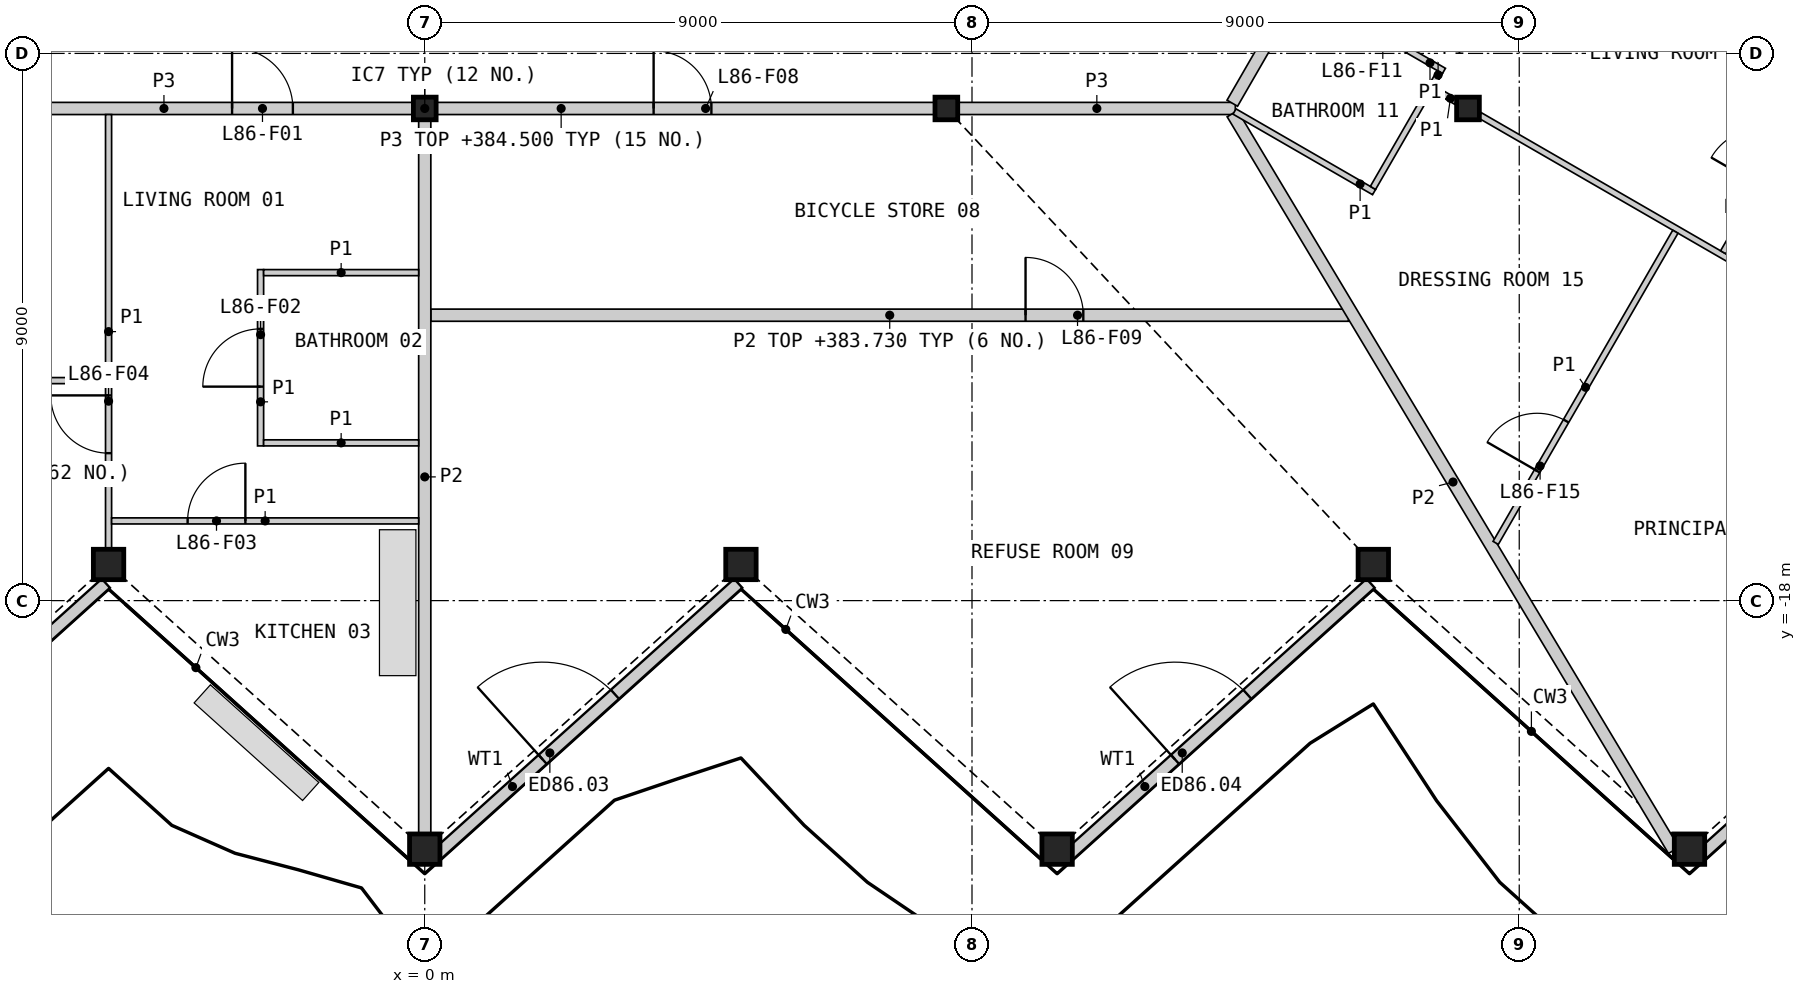
"""IFC4 building model, lengths in metres.
Left out: names, types, materials, properties, quantities, classifications, styles, units other than length and angle.
Written with IfcOpenShell. Run it as: python <this file> out.ifc"""

import sys

from ifc_helpers import new_model, si_unit, direction, frame, frame_2d, origin, origin_2d, place, context, subcontext, project, spatial, rectangle, hollow_rectangle, i_section, extrude, element, fill, save


model = new_model("IFC4")
c1 = context("Model", 3, precision=1e-05, world=origin(), true_north=direction((0.0, 1.0)))
c2 = subcontext(c1, "Body", "Model", "MODEL_VIEW")
j1 = project(units=[si_unit("LENGTHUNIT", "METRE"), si_unit("PLANEANGLEUNIT", "RADIAN")], contexts=[c1])
p1 = place(None, origin())
s1 = spatial("IfcSite", under=j1, at=p1, CompositionType="ELEMENT")
p2 = place(p1, origin())
s2 = spatial("IfcBuilding", under=s1, at=p2, CompositionType="ELEMENT")
p3 = place(p2, frame((0.0, 0.0, 381.4)))
s3 = spatial("IfcBuildingStorey", under=s2, at=p3, CompositionType="ELEMENT", Elevation=381.4)
for number, where, z_axis, x_axis in (
    (1, (-5.2, -17.406, 0.0), (0.0, 0.0, 1.0), (1.0, 0.0, 0.0)),
    (2, (0.0, -22.088, 0.0), (0.0, 0.0, 1.0), (1.0, 0.0, 0.0)),
    (3, (5.2, -17.406, 0.0), (0.0, 0.0, 1.0), (1.0, 0.0, 0.0)),
    (4, (10.4, -22.088, 0.0), (0.0, 0.0, 1.0), (1.0, 0.0, 0.0)),
    (5, (15.6, -17.406, 0.0), (0.0, 0.0, 1.0), (1.0, 0.0, 0.0)),
    (6, (20.8, -22.088, 0.0), (0.0, 0.0, 1.0), (1.0, 0.0, 0.0)),
):
    element("IfcColumn", number, at=place(p3, frame(where, z_axis=z_axis, x_axis=x_axis)), inside=s3, PredefinedType="COLUMN", context=c2, shape_type="SweptSolid", body=[
        extrude(hollow_rectangle(XDim=0.5, YDim=0.5, WallThickness=0.03, at=origin_2d()), origin(), (0.0, 0.0, 1.0), 3.4),
    ])
for number, where, z_axis, x_axis in (
    (7, (0.0, -9.906, 0.0), (0.0, 0.0, 1.0), (1.0, 0.0, 0.0)),
    (8, (8.578, -9.906, 0.0), (0.0, 0.0, 1.0), (1.0, 0.0, 0.0)),
    (9, (17.157, -9.906, 0.0), (0.0, 0.0, 1.0), (1.0, 0.0, 0.0)),
):
    element("IfcColumn", number, at=place(p3, frame(where, z_axis=z_axis, x_axis=x_axis)), inside=s3, PredefinedType="COLUMN", context=c2, shape_type="SweptSolid", body=[
        extrude(i_section(OverallWidth=0.374, OverallDepth=0.372, WebThickness=0.016, FlangeThickness=0.026, at=origin_2d()), origin(), (0.0, 0.0, 1.0), 3.4),
    ])
p4 = place(p3, frame((-10.195, -22.173, 0.0), z_axis=(0.0, 0.0, 1.0), x_axis=(0.743119171875, 0.669159096473, 0.0)))
e10 = element("IfcWall", 10, at=p4, inside=s3, PredefinedType="SOLIDWALL", context=c2, shape_type="SweptSolid", body=[
    extrude(rectangle(XDim=6.661, YDim=0.2, at=frame_2d((3.331, 0.0))), origin(), (0.0, 0.0, 1.0), 2.634),
])
p5 = place(p4, frame((2.333, 0.0, 0.0)))
e11 = element("IfcOpeningElement", 11, at=p5, cuts=e10, PredefinedType="OPENING", context=c2, shape_type="SweptSolid", body=[
    extrude(rectangle(XDim=1.6, YDim=2.25, at=frame_2d((0.8, 1.125))), frame((0.0, 0.11, 0.0), z_axis=(0.0, -1.0, 0.0), x_axis=(1.0, 0.0, 0.0)), (0.0, 0.0, 1.0), 0.22),
])
p6 = place(p3, frame((0.205, -22.173, 0.0), z_axis=(0.0, 0.0, 1.0), x_axis=(0.743135582201, 0.669140871915, 0.0)))
e12 = element("IfcWall", 12, at=p6, inside=s3, PredefinedType="SOLIDWALL", context=c2, shape_type="SweptSolid", body=[
    extrude(rectangle(XDim=6.662, YDim=0.2, at=frame_2d((3.331, 0.0))), origin(), (0.0, 0.0, 1.0), 2.634),
])
p7 = place(p6, frame((2.333, 0.0, 0.0)))
e13 = element("IfcOpeningElement", 13, at=p7, cuts=e12, PredefinedType="OPENING", context=c2, shape_type="SweptSolid", body=[
    extrude(rectangle(XDim=1.6, YDim=2.25, at=frame_2d((0.8, 1.125))), frame((0.0, 0.11, 0.0), z_axis=(0.0, -1.0, 0.0), x_axis=(1.0, 0.0, 0.0)), (0.0, 0.0, 1.0), 0.22),
])
p8 = place(p3, frame((10.605, -22.173, 0.0), z_axis=(0.0, 0.0, 1.0), x_axis=(0.743135582201, 0.669140871915, 0.0)))
e14 = element("IfcWall", 14, at=p8, inside=s3, PredefinedType="SOLIDWALL", context=c2, shape_type="SweptSolid", body=[
    extrude(rectangle(XDim=6.662, YDim=0.2, at=frame_2d((3.331, 0.0))), origin(), (0.0, 0.0, 1.0), 2.634),
])
p9 = place(p8, frame((2.333, 0.0, 0.0)))
e15 = element("IfcOpeningElement", 15, at=p9, cuts=e14, PredefinedType="OPENING", context=c2, shape_type="SweptSolid", body=[
    extrude(rectangle(XDim=1.6, YDim=2.25, at=frame_2d((0.8, 1.125))), frame((0.0, 0.11, 0.0), z_axis=(0.0, -1.0, 0.0), x_axis=(1.0, 0.0, 0.0)), (0.0, 0.0, 1.0), 0.22),
])
p10 = place(p3, frame((21.005, -22.173, 0.0), z_axis=(0.0, 0.0, 1.0), x_axis=(0.743135582201, 0.669140871915, 0.0)))
e16 = element("IfcWall", 16, at=p10, inside=s3, PredefinedType="SOLIDWALL", context=c2, shape_type="SweptSolid", body=[
    extrude(rectangle(XDim=6.662, YDim=0.2, at=frame_2d((3.331, 0.0))), origin(), (0.0, 0.0, 1.0), 2.634),
])
p11 = place(p10, frame((2.333, 0.0, 0.0)))
e17 = element("IfcOpeningElement", 17, at=p11, cuts=e16, PredefinedType="OPENING", context=c2, shape_type="SweptSolid", body=[
    extrude(rectangle(XDim=1.6, YDim=2.25, at=frame_2d((0.8, 1.125))), frame((0.0, 0.11, 0.0), z_axis=(0.0, -1.0, 0.0), x_axis=(1.0, 0.0, 0.0)), (0.0, 0.0, 1.0), 0.22),
])
p12 = place(p3, frame((0.197, -9.906, 0.0), z_axis=(0.0, 0.0, 1.0), x_axis=(1.0, 0.0, 0.0)))
e18 = element("IfcWall", 18, at=p12, inside=s3, PredefinedType="PARTITIONING", context=c2, shape_type="SweptSolid", body=[
    extrude(rectangle(XDim=8.185, YDim=0.2, at=frame_2d((4.092, 0.0))), origin(), (0.0, 0.0, 1.0), 3.1),
])
p13 = place(p12, frame((3.567, 0.0, 0.0)))
e19 = element("IfcOpeningElement", 19, at=p13, cuts=e18, PredefinedType="OPENING", context=c2, shape_type="SweptSolid", body=[
    extrude(rectangle(XDim=0.95, YDim=2.1, at=frame_2d((0.475, 1.05))), frame((0.0, 0.11, 0.0), z_axis=(0.0, -1.0, 0.0), x_axis=(1.0, 0.0, 0.0)), (0.0, 0.0, 1.0), 0.22),
])
p14 = place(p3, frame((-8.382, -9.906, 0.0), z_axis=(0.0, 0.0, 1.0), x_axis=(1.0, 0.0, 0.0)))
e20 = element("IfcWall", 20, at=p14, inside=s3, PredefinedType="PARTITIONING", context=c2, shape_type="SweptSolid", body=[
    extrude(rectangle(XDim=8.185, YDim=0.2, at=frame_2d((4.092, 0.0))), origin(), (0.0, 0.0, 1.0), 3.1),
])
p15 = place(p14, frame((5.213, 0.0, 0.0)))
e21 = element("IfcOpeningElement", 21, at=p15, cuts=e20, PredefinedType="OPENING", context=c2, shape_type="SweptSolid", body=[
    extrude(rectangle(XDim=1.0, YDim=2.1, at=frame_2d((0.5, 1.05))), frame((0.0, 0.11, 0.0), z_axis=(0.0, -1.0, 0.0), x_axis=(1.0, 0.0, 0.0)), (0.0, 0.0, 1.0), 0.22),
])
p16 = place(p3, frame((8.775, -9.906, 0.0), z_axis=(0.0, 0.0, 1.0), x_axis=(1.0, 0.0, 0.0)))
e22 = element("IfcWall", 22, at=p16, inside=s3, PredefinedType="PARTITIONING", context=c2, shape_type="SweptSolid", body=[
    extrude(rectangle(XDim=4.555, YDim=0.2, at=frame_2d((2.278, 0.0))), origin(), (0.0, 0.0, 1.0), 3.1),
])
p17 = place(p3, frame((13.281, -9.819, 0.0), z_axis=(0.0, 0.0, 1.0), x_axis=(0.499948957823, 0.866054870994, 0.0)))
e23 = element("IfcWall", 23, at=p17, inside=s3, PredefinedType="PARTITIONING", context=c2, shape_type="SweptSolid", body=[
    extrude(rectangle(XDim=3.701, YDim=0.2, at=frame_2d((1.851, 0.0))), origin(), (0.0, 0.0, 1.0), 3.1),
])
p18 = place(p17, frame((2.451, 0.0, 0.0)))
e24 = element("IfcOpeningElement", 24, at=p18, cuts=e23, PredefinedType="OPENING", context=c2, shape_type="SweptSolid", body=[
    extrude(rectangle(XDim=1.0, YDim=2.1, at=frame_2d((0.5, 1.05))), frame((0.0, 0.11, 0.0), z_axis=(0.0, -1.0, 0.0), x_axis=(1.0, 0.0, 0.0)), (0.0, 0.0, 1.0), 0.22),
])
p19 = place(p3, frame((0.1, -13.306, 0.0), z_axis=(0.0, 0.0, 1.0), x_axis=(1.0, 0.0, 0.0)))
e25 = element("IfcWall", 25, at=p19, inside=s3, PredefinedType="PARTITIONING", context=c2, shape_type="SweptSolid", body=[
    extrude(rectangle(XDim=15.094, YDim=0.2, at=frame_2d((7.547, 0.0))), origin(), (0.0, 0.0, 1.0), 2.33),
])
p20 = place(p19, frame((9.781, 0.0, 0.0)))
e26 = element("IfcOpeningElement", 26, at=p20, cuts=e25, PredefinedType="OPENING", context=c2, shape_type="SweptSolid", body=[
    extrude(rectangle(XDim=0.95, YDim=2.1, at=frame_2d((0.475, 1.05))), frame((0.0, 0.11, 0.0), z_axis=(0.0, -1.0, 0.0), x_axis=(1.0, 0.0, 0.0)), (0.0, 0.0, 1.0), 0.22),
])
p21 = place(p3, frame((13.282, -9.991, 0.0), z_axis=(0.0, 0.0, 1.0), x_axis=(0.513867741763, -0.857869421285, 0.0)))
e27 = element("IfcWall", 27, at=p21, inside=s3, PredefinedType="PARTITIONING", context=c2, shape_type="SweptSolid", body=[
    extrude(rectangle(XDim=14.124, YDim=0.2, at=frame_2d((7.062, 0.0))), origin(), (0.0, 0.0, 1.0), 2.33),
])
p22 = place(p3, frame((0.0, -21.828, 0.0), z_axis=(0.0, 0.0, 1.0), x_axis=(0.0, 1.0, 0.0)))
e28 = element("IfcWall", 28, at=p22, inside=s3, PredefinedType="PARTITIONING", context=c2, shape_type="SweptSolid", body=[
    extrude(rectangle(XDim=11.725, YDim=0.2, at=frame_2d((5.863, 0.0))), origin(), (0.0, 0.0, 1.0), 2.33),
])
p23 = place(p3, frame((17.354, -10.019, 0.0), z_axis=(0.0, 0.0, 1.0), x_axis=(0.866019680922, -0.500009912158, 0.0)))
e29 = element("IfcWall", 29, at=p23, inside=s3, PredefinedType="PARTITIONING", context=c2, shape_type="SweptSolid", body=[
    extrude(rectangle(XDim=10.881, YDim=0.1, at=frame_2d((5.44, 0.0))), origin(), (0.0, 0.0, 1.0), 2.33),
])
p24 = place(p23, frame((8.176, 0.0, 0.0)))
e30 = element("IfcOpeningElement", 30, at=p24, cuts=e29, PredefinedType="OPENING", context=c2, shape_type="SweptSolid", body=[
    extrude(rectangle(XDim=0.95, YDim=2.1, at=frame_2d((0.475, 1.05))), frame((0.0, 0.06, 0.0), z_axis=(0.0, -1.0, 0.0), x_axis=(1.0, 0.0, 0.0)), (0.0, 0.0, 1.0), 0.12),
])
p25 = place(p3, frame((-5.2, -17.146, 0.0), z_axis=(0.0, 0.0, 1.0), x_axis=(0.0, 1.0, 0.0)))
e31 = element("IfcWall", 31, at=p25, inside=s3, PredefinedType="PARTITIONING", context=c2, shape_type="SweptSolid", body=[
    extrude(rectangle(XDim=7.14, YDim=0.1, at=frame_2d((3.57, 0.0))), origin(), (0.0, 0.0, 1.0), 2.33),
])
p26 = place(p25, frame((1.571, 0.0, 0.0)))
e32 = element("IfcOpeningElement", 32, at=p26, cuts=e31, PredefinedType="OPENING", context=c2, shape_type="SweptSolid", body=[
    extrude(rectangle(XDim=0.95, YDim=2.1, at=frame_2d((0.475, 1.05))), frame((0.0, 0.06, 0.0), z_axis=(0.0, -1.0, 0.0), x_axis=(1.0, 0.0, 0.0)), (0.0, 0.0, 1.0), 0.12),
])
p27 = place(p3, frame((21.354, -12.271, 0.0), z_axis=(0.0, 0.0, 1.0), x_axis=(0.499983931063, 0.866034680991, 0.0)))
e33 = element("IfcWall", 33, at=p27, inside=s3, PredefinedType="PARTITIONING", context=c2, shape_type="SweptSolid", body=[
    extrude(rectangle(XDim=6.358, YDim=0.1, at=frame_2d((3.179, 0.0))), origin(), (0.0, 0.0, 1.0), 2.33),
])
p28 = place(p27, frame((1.252, 0.0, 0.0)))
e34 = element("IfcOpeningElement", 34, at=p28, cuts=e33, PredefinedType="OPENING", context=c2, shape_type="SweptSolid", body=[
    extrude(rectangle(XDim=0.95, YDim=2.1, at=frame_2d((0.475, 1.05))), frame((0.0, 0.06, 0.0), z_axis=(0.0, -1.0, 0.0), x_axis=(1.0, 0.0, 0.0)), (0.0, 0.0, 1.0), 0.12),
])
p29 = place(p3, frame((17.613, -17.051, 0.0), z_axis=(0.0, 0.0, 1.0), x_axis=(0.499982307286, 0.866035618437, 0.0)))
e35 = element("IfcWall", 35, at=p29, inside=s3, PredefinedType="PARTITIONING", context=c2, shape_type="SweptSolid", body=[
    extrude(rectangle(XDim=5.91, YDim=0.1, at=frame_2d((2.955, 0.0))), origin(), (0.0, 0.0, 1.0), 2.33),
])
p30 = place(p29, frame((1.365, 0.0, 0.0)))
e36 = element("IfcOpeningElement", 36, at=p30, cuts=e35, PredefinedType="OPENING", context=c2, shape_type="SweptSolid", body=[
    extrude(rectangle(XDim=0.95, YDim=2.1, at=frame_2d((0.475, 1.05))), frame((0.0, 0.06, 0.0), z_axis=(0.0, -1.0, 0.0), x_axis=(1.0, 0.0, 0.0)), (0.0, 0.0, 1.0), 0.12),
])
p31 = place(p3, frame((-5.15, -16.689, 0.0), z_axis=(0.0, 0.0, 1.0), x_axis=(1.0, 0.0, 0.0)))
e37 = element("IfcWall", 37, at=p31, inside=s3, PredefinedType="PARTITIONING", context=c2, shape_type="SweptSolid", body=[
    extrude(rectangle(XDim=5.05, YDim=0.1, at=frame_2d((2.525, 0.0))), origin(), (0.0, 0.0, 1.0), 2.33),
])
p32 = place(p31, frame((1.25, 0.0, 0.0)))
e38 = element("IfcOpeningElement", 38, at=p32, cuts=e37, PredefinedType="OPENING", context=c2, shape_type="SweptSolid", body=[
    extrude(rectangle(XDim=0.95, YDim=2.1, at=frame_2d((0.475, 1.05))), frame((0.0, 0.06, 0.0), z_axis=(0.0, -1.0, 0.0), x_axis=(1.0, 0.0, 0.0)), (0.0, 0.0, 1.0), 0.12),
])
p33 = place(p3, frame((-10.35, -14.382, 0.0), z_axis=(0.0, 0.0, 1.0), x_axis=(1.0, 0.0, 0.0)))
e39 = element("IfcWall", 39, at=p33, inside=s3, PredefinedType="PARTITIONING", context=c2, shape_type="SweptSolid", body=[
    extrude(rectangle(XDim=5.1, YDim=0.1, at=frame_2d((2.55, 0.0))), origin(), (0.0, 0.0, 1.0), 2.33),
])
p34 = place(p33, frame((0.757, 0.0, 0.0)))
e40 = element("IfcOpeningElement", 40, at=p34, cuts=e39, PredefinedType="OPENING", context=c2, shape_type="SweptSolid", body=[
    extrude(rectangle(XDim=0.95, YDim=2.1, at=frame_2d((0.475, 1.05))), frame((0.0, 0.06, 0.0), z_axis=(0.0, -1.0, 0.0), x_axis=(1.0, 0.0, 0.0)), (0.0, 0.0, 1.0), 0.12),
])
p35 = place(p3, frame((-2.7, -15.456, 0.0), z_axis=(0.0, 0.0, 1.0), x_axis=(0.0, 1.0, 0.0)))
e41 = element("IfcWall", 41, at=p35, inside=s3, PredefinedType="PARTITIONING", context=c2, shape_type="SweptSolid", body=[
    extrude(rectangle(XDim=2.9, YDim=0.1, at=frame_2d((1.45, 0.0))), origin(), (0.0, 0.0, 1.0), 2.33),
])
p36 = place(p35, frame((0.975, 0.0, 0.0)))
e42 = element("IfcOpeningElement", 42, at=p36, cuts=e41, PredefinedType="OPENING", context=c2, shape_type="SweptSolid", body=[
    extrude(rectangle(XDim=0.95, YDim=2.1, at=frame_2d((0.475, 1.05))), frame((0.0, 0.06, 0.0), z_axis=(0.0, -1.0, 0.0), x_axis=(1.0, 0.0, 0.0)), (0.0, 0.0, 1.0), 0.12),
])
for number, where, z_axis, x_axis in (
    (43, (-2.65, -12.606, 0.0), (0.0, 0.0, 1.0), (1.0, 0.0, 0.0)),
    (44, (-2.65, -15.406, 0.0), (0.0, 0.0, 1.0), (1.0, 0.0, 0.0)),
):
    element("IfcWall", number, at=place(p3, frame(where, z_axis=z_axis, x_axis=x_axis)), inside=s3, PredefinedType="PARTITIONING", context=c2, shape_type="SweptSolid", body=[
        extrude(rectangle(XDim=2.55, YDim=0.1, at=frame_2d((1.275, 0.0))), origin(), (0.0, 0.0, 1.0), 2.33),
    ])
p37 = place(p3, frame((13.317, -9.956, 0.0), z_axis=(0.0, 0.0, 1.0), x_axis=(0.866052124492, -0.499953715521, 0.0)))
e45 = element("IfcWall", 45, at=p37, inside=s3, PredefinedType="PARTITIONING", context=c2, shape_type="SweptSolid", body=[
    extrude(rectangle(XDim=2.65, YDim=0.1, at=frame_2d((1.325, 0.0))), origin(), (0.0, 0.0, 1.0), 2.33),
])
p38 = place(p3, frame((14.468, -7.964, 0.0), z_axis=(0.0, 0.0, 1.0), x_axis=(0.86603978909, -0.499975083092, 0.0)))
e46 = element("IfcWall", 46, at=p38, inside=s3, PredefinedType="PARTITIONING", context=c2, shape_type="SweptSolid", body=[
    extrude(rectangle(XDim=2.649, YDim=0.1, at=frame_2d((1.325, 0.0))), origin(), (0.0, 0.0, 1.0), 2.33),
])
p39 = place(p38, frame((1.013, 0.0, 0.0)))
e47 = element("IfcOpeningElement", 47, at=p39, cuts=e46, PredefinedType="OPENING", context=c2, shape_type="SweptSolid", body=[
    extrude(rectangle(XDim=0.95, YDim=2.1, at=frame_2d((0.475, 1.05))), frame((0.0, 0.06, 0.0), z_axis=(0.0, -1.0, 0.0), x_axis=(1.0, 0.0, 0.0)), (0.0, 0.0, 1.0), 0.12),
])
p40 = place(p3, frame((15.594, -11.212, 0.0), z_axis=(0.0, 0.0, 1.0), x_axis=(0.500011643316, 0.866018681408, 0.0)))
e48 = element("IfcWall", 48, at=p40, inside=s3, PredefinedType="PARTITIONING", context=c2, shape_type="SweptSolid", body=[
    extrude(rectangle(XDim=1.973, YDim=0.1, at=frame_2d((0.987, 0.0))), origin(), (0.0, 0.0, 1.0), 2.33),
])
p41 = place(p3, frame((16.594, -9.581, 0.0), z_axis=(0.0, 0.0, 1.0), x_axis=(0.866137484628, -0.499805820016, 0.0)))
e49 = element("IfcWall", 49, at=p41, inside=s3, PredefinedType="PARTITIONING", context=c2, shape_type="SweptSolid", body=[
    extrude(rectangle(XDim=0.423, YDim=0.1, at=frame_2d((0.211, 0.0))), origin(), (0.0, 0.0, 1.0), 2.33),
])
p42 = place(p3, frame((16.582, -9.501, 0.0), z_axis=(0.0, 0.0, 1.0), x_axis=(0.498246276801, 0.867035551551, 0.0)))
e50 = element("IfcWall", 50, at=p42, inside=s3, PredefinedType="PARTITIONING", context=c2, shape_type="SweptSolid", body=[
    extrude(rectangle(XDim=0.224, YDim=0.1, at=frame_2d((0.112, 0.0))), origin(), (0.0, 0.0, 1.0), 2.33),
])
p43 = place(p7, origin())
e51 = element("IfcDoor", 51, at=p43, inside=s3, OperationType="DOUBLE_DOOR_SINGLE_SWING", PredefinedType="DOOR", context=c2, shape_type="SweptSolid", body=[
    extrude(rectangle(XDim=1.6, YDim=2.25, at=frame_2d((0.8, 1.125))), frame((0.0, 0.025, 0.0), z_axis=(0.0, -1.0, 0.0), x_axis=(1.0, 0.0, 0.0)), (0.0, 0.0, 1.0), 0.05),
])
fill(e13, e51)
p44 = place(p9, origin())
e52 = element("IfcDoor", 52, at=p44, inside=s3, OperationType="DOUBLE_DOOR_SINGLE_SWING", PredefinedType="DOOR", context=c2, shape_type="SweptSolid", body=[
    extrude(rectangle(XDim=1.6, YDim=2.25, at=frame_2d((0.8, 1.125))), frame((0.0, 0.025, 0.0), z_axis=(0.0, -1.0, 0.0), x_axis=(1.0, 0.0, 0.0)), (0.0, 0.0, 1.0), 0.05),
])
fill(e15, e52)
p45 = place(p15, origin())
e53 = element("IfcDoor", 53, at=p45, inside=s3, OperationType="SINGLE_SWING_LEFT", PredefinedType="DOOR", context=c2, shape_type="SweptSolid", body=[
    extrude(rectangle(XDim=1.0, YDim=2.1, at=frame_2d((0.5, 1.05))), frame((0.0, 0.025, 0.0), z_axis=(0.0, -1.0, 0.0), x_axis=(1.0, 0.0, 0.0)), (0.0, 0.0, 1.0), 0.05),
])
fill(e21, e53)
p46 = place(p36, origin())
e54 = element("IfcDoor", 54, at=p46, inside=s3, OperationType="SINGLE_SWING_LEFT", PredefinedType="DOOR", context=c2, shape_type="SweptSolid", body=[
    extrude(rectangle(XDim=0.95, YDim=2.1, at=frame_2d((0.475, 1.05))), frame((0.0, 0.025, 0.0), z_axis=(0.0, -1.0, 0.0), x_axis=(1.0, 0.0, 0.0)), (0.0, 0.0, 1.0), 0.05),
])
fill(e42, e54)
p47 = place(p32, origin())
e55 = element("IfcDoor", 55, at=p47, inside=s3, OperationType="SINGLE_SWING_RIGHT", PredefinedType="DOOR", context=c2, shape_type="SweptSolid", body=[
    extrude(rectangle(XDim=0.95, YDim=2.1, at=frame_2d((0.475, 1.05))), frame((0.0, 0.025, 0.0), z_axis=(0.0, -1.0, 0.0), x_axis=(1.0, 0.0, 0.0)), (0.0, 0.0, 1.0), 0.05),
])
fill(e38, e55)
p48 = place(p26, origin())
e56 = element("IfcDoor", 56, at=p48, inside=s3, OperationType="SINGLE_SWING_RIGHT", PredefinedType="DOOR", context=c2, shape_type="SweptSolid", body=[
    extrude(rectangle(XDim=0.95, YDim=2.1, at=frame_2d((0.475, 1.05))), frame((0.0, 0.025, 0.0), z_axis=(0.0, -1.0, 0.0), x_axis=(1.0, 0.0, 0.0)), (0.0, 0.0, 1.0), 0.05),
])
fill(e32, e56)
p49 = place(p13, origin())
e57 = element("IfcDoor", 57, at=p49, inside=s3, OperationType="SINGLE_SWING_LEFT", PredefinedType="DOOR", context=c2, shape_type="SweptSolid", body=[
    extrude(rectangle(XDim=0.95, YDim=2.1, at=frame_2d((0.475, 1.05))), frame((0.0, 0.025, 0.0), z_axis=(0.0, -1.0, 0.0), x_axis=(1.0, 0.0, 0.0)), (0.0, 0.0, 1.0), 0.05),
])
fill(e19, e57)
p50 = place(p20, origin())
e58 = element("IfcDoor", 58, at=p50, inside=s3, OperationType="SINGLE_SWING_LEFT", PredefinedType="DOOR", context=c2, shape_type="SweptSolid", body=[
    extrude(rectangle(XDim=0.95, YDim=2.1, at=frame_2d((0.475, 1.05))), frame((0.0, 0.025, 0.0), z_axis=(0.0, -1.0, 0.0), x_axis=(1.0, 0.0, 0.0)), (0.0, 0.0, 1.0), 0.05),
])
fill(e26, e58)
p51 = place(p30, origin())
e59 = element("IfcDoor", 59, at=p51, inside=s3, OperationType="SINGLE_SWING_LEFT", PredefinedType="DOOR", context=c2, shape_type="SweptSolid", body=[
    extrude(rectangle(XDim=0.95, YDim=2.1, at=frame_2d((0.475, 1.05))), frame((0.0, 0.025, 0.0), z_axis=(0.0, -1.0, 0.0), x_axis=(1.0, 0.0, 0.0)), (0.0, 0.0, 1.0), 0.05),
])
fill(e36, e59)
save(model, sys.argv[1])
